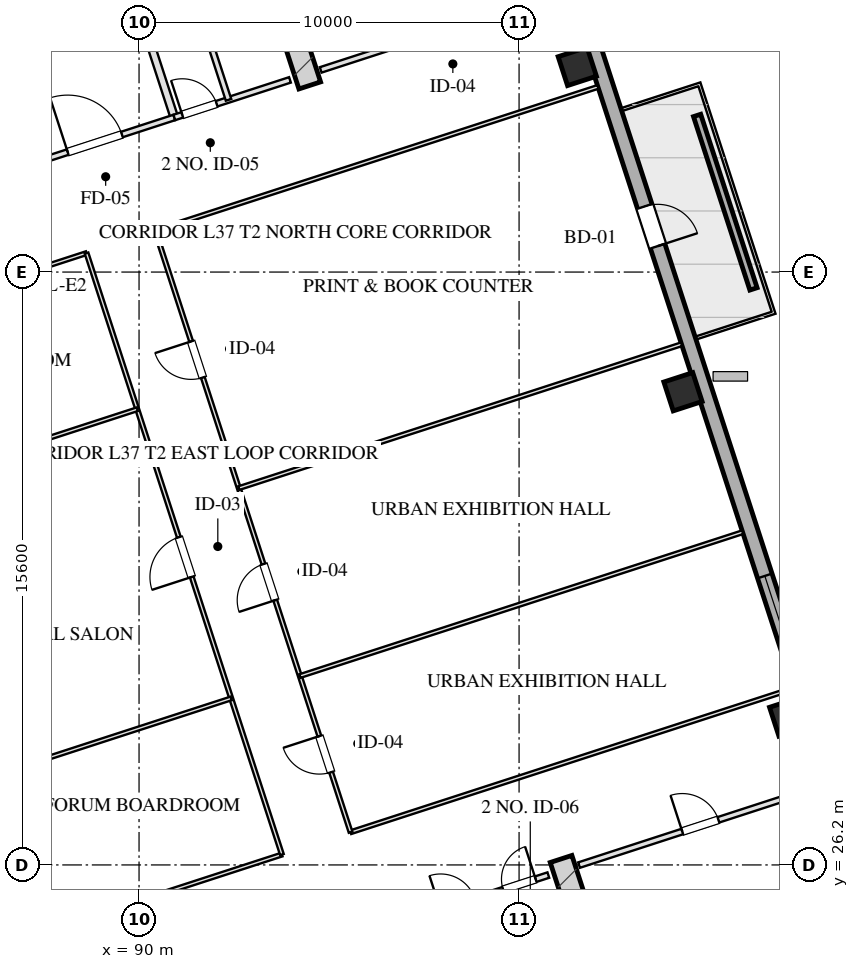
"""IFC4 building model, lengths in metres.
Left out: names, types, materials, properties, quantities, classifications, styles, units other than length and angle.
Written with IfcOpenShell. Run it as: python <this file> out.ifc"""

import sys

from ifc_helpers import new_model, si_unit, direction, frame, frame_2d, origin, origin_2d, place, context, subcontext, project, spatial, rectangle, hollow_rectangle, extrude, element, fill, save


model = new_model("IFC4")
c1 = context("Model", 3, precision=1e-05, world=origin(), true_north=direction((0.0, 1.0)))
c2 = subcontext(c1, "Body", "Model", "MODEL_VIEW")
j1 = project(units=[si_unit("LENGTHUNIT", "METRE"), si_unit("PLANEANGLEUNIT", "RADIAN")], contexts=[c1])
p1 = place(None, origin())
s1 = spatial("IfcSite", under=j1, at=p1, CompositionType="ELEMENT")
p2 = place(p1, origin())
s2 = spatial("IfcBuilding", under=s1, at=p2, CompositionType="ELEMENT")
p3 = place(p2, frame((0.0, 0.0, 142.6)))
s3 = spatial("IfcBuildingStorey", under=s2, at=p3, CompositionType="ELEMENT", Elevation=142.6)
for number, where, z_axis, x_axis in (
    (1, (101.105, 26.358, 0.0), (0.0, 0.0, 1.0), (0.309, -0.951, 0.0)),
    (2, (94.492, 46.71, 0.0), (0.0, 0.0, 1.0), (-0.309, 0.951, 0.0)),
):
    element("IfcWall", number, at=place(p3, frame(where, z_axis=z_axis, x_axis=x_axis)), inside=s3, PredefinedType="SHEAR", context=c2, shape_type="SweptSolid", body=[
        extrude(rectangle(XDim=9.48, YDim=0.6, at=frame_2d((4.74, 0.0))), origin(), (0.0, 0.0, 1.0), 3.45),
    ])
for number, where, z_axis, x_axis in (
    (3, (107.094, 30.091, 0.0), (0.0, 0.0, 1.0), (0.951, 0.309, 0.0)),
    (4, (104.313, 38.651, 0.0), (0.0, 0.0, 1.0), (0.951, 0.309, 0.0)),
    (5, (101.532, 47.21, 0.0), (0.0, 0.0, 1.0), (0.951, 0.309, 0.0)),
):
    element("IfcColumn", number, at=place(p3, frame(where, z_axis=z_axis, x_axis=x_axis)), inside=s3, PredefinedType="COLUMN", context=c2, shape_type="SweptSolid", body=[
        extrude(hollow_rectangle(XDim=0.8, YDim=0.8, WallThickness=0.028, at=origin_2d()), origin(), (0.0, 0.0, 1.0), 3.451),
    ])
p4 = place(p3, frame((98.224, 59.173, 0.0), z_axis=(0.0, 0.0, 1.0), x_axis=(0.309014228706, -0.951057414911, 0.0)))
e6 = element("IfcWall", 6, at=p4, inside=s3, PredefinedType="SOLIDWALL", context=c2, shape_type="SweptSolid", body=[
    extrude(rectangle(XDim=42.8, YDim=0.4, at=frame_2d((21.4, 0.0))), origin(), (0.0, 0.0, 1.0), 2.61),
])
p5 = place(p4, frame((26.675, 0.0, 0.75)))
e7 = element("IfcOpeningElement", 7, at=p5, cuts=e6, PredefinedType="OPENING", context=c2, shape_type="SweptSolid", body=[
    extrude(rectangle(XDim=2.25, YDim=1.46, at=frame_2d((1.125, 0.73))), frame((0.0, 0.21, 0.0), z_axis=(0.0, -1.0, 0.0), x_axis=(1.0, 0.0, 0.0)), (0.0, 0.0, 1.0), 0.42),
])
p6 = place(p4, frame((16.45, 0.0, 0.0)))
e8 = element("IfcOpeningElement", 8, at=p6, cuts=e6, PredefinedType="OPENING", context=c2, shape_type="SweptSolid", body=[
    extrude(rectangle(XDim=1.1, YDim=2.15, at=frame_2d((0.55, 1.075))), frame((0.0, 0.21, 0.0), z_axis=(0.0, -1.0, 0.0), x_axis=(1.0, 0.0, 0.0)), (0.0, 0.0, 1.0), 0.42),
])
p7 = place(p3, frame((106.168, 41.356, 0.0), z_axis=(0.0, 0.0, 1.0), x_axis=(-0.309032019345, 0.951051634255, 0.0)))
e9 = element("IfcWall", 9, at=p7, inside=s3, PredefinedType="PARAPET", context=c2, shape_type="SweptSolid", body=[
    extrude(rectangle(XDim=4.8, YDim=0.2, at=frame_2d((2.4, 0.0))), origin(), (0.0, 0.0, 1.0), 0.75),
])
p8 = place(p3, frame((97.727, 24.944, 0.0), z_axis=(0.0, 0.0, 1.0), x_axis=(0.951036872128, 0.309077446369, 0.0)))
e10 = element("IfcWall", 10, at=p8, inside=s3, PredefinedType="PARTITIONING", context=c2, shape_type="SweptSolid", body=[
    extrude(rectangle(XDim=3.2, YDim=0.15, at=frame_2d((1.6, 0.0))), origin(), (0.0, 0.0, 1.0), 3.175),
])
p9 = place(p8, frame((0.22, 0.0, 0.0)))
e11 = element("IfcOpeningElement", 11, at=p9, cuts=e10, PredefinedType="OPENING", context=c2, shape_type="SweptSolid", body=[
    extrude(rectangle(XDim=0.95, YDim=2.05, at=frame_2d((0.475, 1.025))), frame((0.0, 0.085, 0.0), z_axis=(0.0, -1.0, 0.0), x_axis=(1.0, 0.0, 0.0)), (0.0, 0.0, 1.0), 0.17),
])
p10 = place(p8, frame((1.95, 0.0, 0.0)))
e12 = element("IfcOpeningElement", 12, at=p10, cuts=e10, PredefinedType="OPENING", context=c2, shape_type="SweptSolid", body=[
    extrude(rectangle(XDim=0.9, YDim=2.05, at=frame_2d((0.45, 1.025))), frame((0.0, 0.085, 0.0), z_axis=(0.0, -1.0, 0.0), x_axis=(1.0, 0.0, 0.0)), (0.0, 0.0, 1.0), 0.17),
])
p11 = place(p3, frame((90.928, 45.868, 0.0), z_axis=(0.0, 0.0, 1.0), x_axis=(-0.309042196757, 0.951048327176, 0.0)))
e13 = element("IfcWall", 13, at=p11, inside=s3, PredefinedType="PARTITIONING", context=c2, shape_type="SweptSolid", body=[
    extrude(rectangle(XDim=8.43, YDim=0.2, at=frame_2d((4.215, 0.0))), origin(), (0.0, 0.0, 1.0), 3.175),
])
p12 = place(p3, frame((86.743, 44.508, 0.0), z_axis=(0.0, 0.0, 1.0), x_axis=(0.951063829732, 0.308994485023, 0.0)))
e14 = element("IfcWall", 14, at=p12, inside=s3, PredefinedType="PARTITIONING", context=c2, shape_type="SweptSolid", body=[
    extrude(rectangle(XDim=4.4, YDim=0.15, at=frame_2d((2.2, 0.0))), origin(), (0.0, 0.0, 1.0), 3.175),
])
p13 = place(p12, frame((1.45, 0.0, 0.0)))
e15 = element("IfcOpeningElement", 15, at=p13, cuts=e14, PredefinedType="OPENING", context=c2, shape_type="SweptSolid", body=[
    extrude(rectangle(XDim=1.5, YDim=2.05, at=frame_2d((0.75, 1.025))), frame((0.0, 0.085, 0.0), z_axis=(0.0, -1.0, 0.0), x_axis=(1.0, 0.0, 0.0)), (0.0, 0.0, 1.0), 0.17),
])
p14 = place(p3, frame((85.718, 47.666, 0.0), z_axis=(0.0, 0.0, 1.0), x_axis=(0.951058531764, 0.30901079133, 0.0)))
e16 = element("IfcWall", 16, at=p14, inside=s3, PredefinedType="PARTITIONING", context=c2, shape_type="SweptSolid", body=[
    extrude(rectangle(XDim=4.4, YDim=0.2, at=frame_2d((2.2, 0.0))), origin(), (0.0, 0.0, 1.0), 3.175),
])
p15 = place(p14, frame((0.45, 0.0, 0.0)))
e17 = element("IfcOpeningElement", 17, at=p15, cuts=e16, PredefinedType="OPENING", context=c2, shape_type="SweptSolid", body=[
    extrude(rectangle(XDim=1.1, YDim=2.05, at=frame_2d((0.55, 1.025))), frame((0.0, 0.11, 0.0), z_axis=(0.0, -1.0, 0.0), x_axis=(1.0, 0.0, 0.0)), (0.0, 0.0, 1.0), 0.22),
])
p16 = place(p14, frame((2.55, 0.0, 0.0)))
e18 = element("IfcOpeningElement", 18, at=p16, cuts=e16, PredefinedType="OPENING", context=c2, shape_type="SweptSolid", body=[
    extrude(rectangle(XDim=1.1, YDim=2.05, at=frame_2d((0.55, 1.025))), frame((0.0, 0.11, 0.0), z_axis=(0.0, -1.0, 0.0), x_axis=(1.0, 0.0, 0.0)), (0.0, 0.0, 1.0), 0.22),
])
p17 = place(p3, frame((90.928, 45.868, 0.0), z_axis=(0.0, 0.0, 1.0), x_axis=(0.951059297078, 0.309008435874, 0.0)))
e19 = element("IfcWall", 19, at=p17, inside=s3, PredefinedType="PARTITIONING", context=c2, shape_type="SweptSolid", body=[
    extrude(rectangle(XDim=3.2, YDim=0.15, at=frame_2d((1.6, 0.0))), origin(), (0.0, 0.0, 1.0), 3.175),
])
p18 = place(p17, frame((0.22, 0.0, 0.0)))
e20 = element("IfcOpeningElement", 20, at=p18, cuts=e19, PredefinedType="OPENING", context=c2, shape_type="SweptSolid", body=[
    extrude(rectangle(XDim=0.95, YDim=2.05, at=frame_2d((0.475, 1.025))), frame((0.0, 0.085, 0.0), z_axis=(0.0, -1.0, 0.0), x_axis=(1.0, 0.0, 0.0)), (0.0, 0.0, 1.0), 0.17),
])
p19 = place(p3, frame((92.355, 46.331, 0.0), z_axis=(0.0, 0.0, 1.0), x_axis=(-0.309007490203, 0.951059604335, 0.0)))
e21 = element("IfcWall", 21, at=p19, inside=s3, PredefinedType="PARTITIONING", context=c2, shape_type="SweptSolid", body=[
    extrude(rectangle(XDim=8.43, YDim=0.15, at=frame_2d((4.215, 0.0))), origin(), (0.0, 0.0, 1.0), 3.175),
])
p20 = place(p19, frame((2.55, 0.0, 0.0)))
e22 = element("IfcOpeningElement", 22, at=p20, cuts=e21, PredefinedType="OPENING", context=c2, shape_type="SweptSolid", body=[
    extrude(rectangle(XDim=0.95, YDim=2.05, at=frame_2d((0.475, 1.025))), frame((0.0, 0.085, 0.0), z_axis=(0.0, -1.0, 0.0), x_axis=(1.0, 0.0, 0.0)), (0.0, 0.0, 1.0), 0.17),
])
p21 = place(p19, frame((5.8, 0.0, 0.0)))
e23 = element("IfcOpeningElement", 23, at=p21, cuts=e21, PredefinedType="OPENING", context=c2, shape_type="SweptSolid", body=[
    extrude(rectangle(XDim=0.9, YDim=2.05, at=frame_2d((0.45, 1.025))), frame((0.0, 0.085, 0.0), z_axis=(0.0, -1.0, 0.0), x_axis=(1.0, 0.0, 0.0)), (0.0, 0.0, 1.0), 0.17),
])
p22 = place(p3, frame((101.578, 26.196, 0.0), z_axis=(0.0, 0.0, 1.0), x_axis=(0.951064934653, 0.308991084134, 0.0)))
e24 = element("IfcWall", 24, at=p22, inside=s3, PredefinedType="PARTITIONING", context=c2, shape_type="SweptSolid", body=[
    extrude(rectangle(XDim=6.8, YDim=0.15, at=frame_2d((3.4, 0.0))), origin(), (0.0, 0.0, 1.0), 3.175),
])
p23 = place(p22, frame((2.856, 0.0, 0.0)))
e25 = element("IfcOpeningElement", 25, at=p23, cuts=e24, PredefinedType="OPENING", context=c2, shape_type="SweptSolid", body=[
    extrude(rectangle(XDim=1.0, YDim=2.05, at=frame_2d((0.5, 1.025))), frame((0.0, 0.085, 0.0), z_axis=(0.0, -1.0, 0.0), x_axis=(1.0, 0.0, 0.0)), (0.0, 0.0, 1.0), 0.17),
])
p24 = place(p3, frame((94.78, 47.119, 0.0), z_axis=(0.0, 0.0, 1.0), x_axis=(0.951057811516, 0.309013008068, 0.0)))
e26 = element("IfcWall", 26, at=p24, inside=s3, PredefinedType="PARTITIONING", context=c2, shape_type="SweptSolid", body=[
    extrude(rectangle(XDim=6.8, YDim=0.15, at=frame_2d((3.4, 0.0))), origin(), (0.0, 0.0, 1.0), 3.175),
])
p25 = place(p24, frame((2.856, 0.0, 0.0)))
e27 = element("IfcOpeningElement", 27, at=p25, cuts=e26, PredefinedType="OPENING", context=c2, shape_type="SweptSolid", body=[
    extrude(rectangle(XDim=1.0, YDim=2.05, at=frame_2d((0.5, 1.025))), frame((0.0, 0.085, 0.0), z_axis=(0.0, -1.0, 0.0), x_axis=(1.0, 0.0, 0.0)), (0.0, 0.0, 1.0), 0.17),
])
p26 = place(p3, frame((85.248, 23.708, 0.0), z_axis=(0.0, 0.0, 1.0), x_axis=(0.951059123431, 0.309008970321, 0.0)))
e28 = element("IfcWall", 28, at=p26, inside=s3, PredefinedType="MOVABLE", context=c2, shape_type="SweptSolid", body=[
    extrude(rectangle(XDim=8.95, YDim=0.1, at=frame_2d((4.475, 0.0))), origin(), (0.0, 0.0, 1.0), 3.175),
])
p27 = place(p3, frame((95.567, 27.061, 0.0), z_axis=(0.0, 0.0, 1.0), x_axis=(0.9510516424, 0.30903199428, 0.0)))
e29 = element("IfcWall", 29, at=p27, inside=s3, PredefinedType="MOVABLE", context=c2, shape_type="SweptSolid", body=[
    extrude(rectangle(XDim=12.25, YDim=0.1, at=frame_2d((6.125, 0.0))), origin(), (0.0, 0.0, 1.0), 3.175),
])
p28 = place(p3, frame((80.106, 39.533, 0.0), z_axis=(0.0, 0.0, 1.0), x_axis=(0.951059123431, 0.309008970321, 0.0)))
e30 = element("IfcWall", 30, at=p28, inside=s3, PredefinedType="MOVABLE", context=c2, shape_type="SweptSolid", body=[
    extrude(rectangle(XDim=8.95, YDim=0.1, at=frame_2d((4.475, 0.0))), origin(), (0.0, 0.0, 1.0), 3.175),
])
p29 = place(p3, frame((90.425, 42.886, 0.0), z_axis=(0.0, 0.0, 1.0), x_axis=(0.95105749975, 0.309013967595, 0.0)))
e31 = element("IfcWall", 31, at=p29, inside=s3, PredefinedType="MOVABLE", context=c2, shape_type="SweptSolid", body=[
    extrude(rectangle(XDim=12.25, YDim=0.1, at=frame_2d((6.125, 0.0))), origin(), (0.0, 0.0, 1.0), 3.175),
])
p30 = place(p3, frame((93.76, 26.473, 0.0), z_axis=(0.0, 0.0, 1.0), x_axis=(-0.309004459387, 0.951060589068, 0.0)))
e32 = element("IfcWall", 32, at=p30, inside=s3, PredefinedType="MOVABLE", context=c2, shape_type="SweptSolid", body=[
    extrude(rectangle(XDim=16.64, YDim=0.1, at=frame_2d((8.32, 0.0))), origin(), (0.0, 0.0, 1.0), 3.175),
])
p31 = place(p30, frame((7.68, 0.0, 0.0)))
e33 = element("IfcOpeningElement", 33, at=p31, cuts=e32, PredefinedType="OPENING", context=c2, shape_type="SweptSolid", body=[
    extrude(rectangle(XDim=1.1, YDim=2.05, at=frame_2d((0.55, 1.025))), frame((0.0, 0.06, 0.0), z_axis=(0.0, -1.0, 0.0), x_axis=(1.0, 0.0, 0.0)), (0.0, 0.0, 1.0), 0.12),
])
p32 = place(p3, frame((95.567, 27.061, 0.0), z_axis=(0.0, 0.0, 1.0), x_axis=(-0.30901773025, 0.951056277195, 0.0)))
e34 = element("IfcWall", 34, at=p32, inside=s3, PredefinedType="MOVABLE", context=c2, shape_type="SweptSolid", body=[
    extrude(rectangle(XDim=16.64, YDim=0.1, at=frame_2d((8.32, 0.0))), origin(), (0.0, 0.0, 1.0), 3.175),
])
p33 = place(p32, frame((1.66, 0.0, 0.0)))
e35 = element("IfcOpeningElement", 35, at=p33, cuts=e34, PredefinedType="OPENING", context=c2, shape_type="SweptSolid", body=[
    extrude(rectangle(XDim=1.0, YDim=2.05, at=frame_2d((0.5, 1.025))), frame((0.0, 0.06, 0.0), z_axis=(0.0, -1.0, 0.0), x_axis=(1.0, 0.0, 0.0)), (0.0, 0.0, 1.0), 0.12),
])
p34 = place(p32, frame((6.42, 0.0, 0.0)))
e36 = element("IfcOpeningElement", 36, at=p34, cuts=e34, PredefinedType="OPENING", context=c2, shape_type="SweptSolid", body=[
    extrude(rectangle(XDim=1.0, YDim=2.05, at=frame_2d((0.5, 1.025))), frame((0.0, 0.06, 0.0), z_axis=(0.0, -1.0, 0.0), x_axis=(1.0, 0.0, 0.0)), (0.0, 0.0, 1.0), 0.12),
])
p35 = place(p32, frame((12.58, 0.0, 0.0)))
e37 = element("IfcOpeningElement", 37, at=p35, cuts=e34, PredefinedType="OPENING", context=c2, shape_type="SweptSolid", body=[
    extrude(rectangle(XDim=1.0, YDim=2.05, at=frame_2d((0.5, 1.025))), frame((0.0, 0.06, 0.0), z_axis=(0.0, -1.0, 0.0), x_axis=(1.0, 0.0, 0.0)), (0.0, 0.0, 1.0), 0.12),
])
p36 = place(p3, frame((83.913, 27.816, 0.0), z_axis=(0.0, 0.0, 1.0), x_axis=(0.951059123431, 0.309008970321, 0.0)))
e38 = element("IfcWall", 38, at=p36, inside=s3, PredefinedType="MOVABLE", context=c2, shape_type="SweptSolid", body=[
    extrude(rectangle(XDim=8.95, YDim=0.1, at=frame_2d((4.475, 0.0))), origin(), (0.0, 0.0, 1.0), 3.175),
])
p37 = place(p3, frame((81.441, 35.425, 0.0), z_axis=(0.0, 0.0, 1.0), x_axis=(0.951056518616, 0.309016987233, 0.0)))
e39 = element("IfcWall", 39, at=p37, inside=s3, PredefinedType="MOVABLE", context=c2, shape_type="SweptSolid", body=[
    extrude(rectangle(XDim=8.95, YDim=0.1, at=frame_2d((4.475, 0.0))), origin(), (0.0, 0.0, 1.0), 3.175),
])
for number, where, z_axis, x_axis in (
    (40, (94.232, 31.169, 0.0), (0.0, 0.0, 1.0), (0.951, 0.309, 0.0)),
    (41, (92.625, 36.115, 0.0), (0.0, 0.0, 1.0), (0.951, 0.309, 0.0)),
):
    element("IfcWall", number, at=place(p3, frame(where, z_axis=z_axis, x_axis=x_axis)), inside=s3, PredefinedType="MOVABLE", context=c2, shape_type="SweptSolid", body=[
        extrude(rectangle(XDim=12.25, YDim=0.1, at=frame_2d((6.125, 0.0))), origin(), (0.0, 0.0, 1.0), 3.175),
    ])
p38 = place(p5, origin())
e42 = element("IfcWindow", 42, at=p38, inside=s3, PartitioningType="TRIPLE_PANEL_VERTICAL", PredefinedType="WINDOW", context=c2, shape_type="SweptSolid", body=[
    extrude(rectangle(XDim=2.25, YDim=1.46, at=frame_2d((1.125, 0.73))), frame((0.0, 0.03, 0.0), z_axis=(0.0, -1.0, 0.0), x_axis=(1.0, 0.0, 0.0)), (0.0, 0.0, 1.0), 0.06),
])
fill(e7, e42)
p39 = place(p6, origin())
e43 = element("IfcDoor", 43, at=p39, inside=s3, OperationType="SINGLE_SWING_RIGHT", PredefinedType="DOOR", context=c2, shape_type="SweptSolid", body=[
    extrude(rectangle(XDim=1.1, YDim=2.15, at=frame_2d((0.55, 1.075))), frame((0.0, 0.025, 0.0), z_axis=(0.0, -1.0, 0.0), x_axis=(1.0, 0.0, 0.0)), (0.0, 0.0, 1.0), 0.05),
])
fill(e8, e43)
p40 = place(p10, origin())
e44 = element("IfcDoor", 44, at=p40, inside=s3, OperationType="SINGLE_SWING_RIGHT", PredefinedType="DOOR", context=c2, shape_type="SweptSolid", body=[
    extrude(rectangle(XDim=0.9, YDim=2.05, at=frame_2d((0.45, 1.025))), frame((0.0, 0.025, 0.0), z_axis=(0.0, -1.0, 0.0), x_axis=(1.0, 0.0, 0.0)), (0.0, 0.0, 1.0), 0.05),
])
fill(e12, e44)
p41 = place(p13, origin())
e45 = element("IfcDoor", 45, at=p41, inside=s3, OperationType="SINGLE_SWING_LEFT", PredefinedType="DOOR", context=c2, shape_type="SweptSolid", body=[
    extrude(rectangle(XDim=1.5, YDim=2.05, at=frame_2d((0.75, 1.025))), frame((0.0, 0.025, 0.0), z_axis=(0.0, -1.0, 0.0), x_axis=(1.0, 0.0, 0.0)), (0.0, 0.0, 1.0), 0.05),
])
fill(e15, e45)
p42 = place(p18, origin())
e46 = element("IfcDoor", 46, at=p42, inside=s3, OperationType="SINGLE_SWING_LEFT", PredefinedType="DOOR", context=c2, shape_type="SweptSolid", body=[
    extrude(rectangle(XDim=0.95, YDim=2.05, at=frame_2d((0.475, 1.025))), frame((0.0, 0.025, 0.0), z_axis=(0.0, -1.0, 0.0), x_axis=(1.0, 0.0, 0.0)), (0.0, 0.0, 1.0), 0.05),
])
fill(e20, e46)
p43 = place(p23, origin())
e47 = element("IfcDoor", 47, at=p43, inside=s3, OperationType="SINGLE_SWING_LEFT", PredefinedType="DOOR", context=c2, shape_type="SweptSolid", body=[
    extrude(rectangle(XDim=1.0, YDim=2.05, at=frame_2d((0.5, 1.025))), frame((0.0, 0.025, 0.0), z_axis=(0.0, -1.0, 0.0), x_axis=(1.0, 0.0, 0.0)), (0.0, 0.0, 1.0), 0.05),
])
fill(e25, e47)
p44 = place(p31, origin())
e48 = element("IfcDoor", 48, at=p44, inside=s3, OperationType="SINGLE_SWING_LEFT", PredefinedType="DOOR", context=c2, shape_type="SweptSolid", body=[
    extrude(rectangle(XDim=1.1, YDim=2.05, at=frame_2d((0.55, 1.025))), frame((0.0, 0.025, 0.0), z_axis=(0.0, -1.0, 0.0), x_axis=(1.0, 0.0, 0.0)), (0.0, 0.0, 1.0), 0.05),
])
fill(e33, e48)
p45 = place(p33, origin())
e49 = element("IfcDoor", 49, at=p45, inside=s3, OperationType="SINGLE_SWING_RIGHT", PredefinedType="DOOR", context=c2, shape_type="SweptSolid", body=[
    extrude(rectangle(XDim=1.0, YDim=2.05, at=frame_2d((0.5, 1.025))), frame((0.0, 0.025, 0.0), z_axis=(0.0, -1.0, 0.0), x_axis=(1.0, 0.0, 0.0)), (0.0, 0.0, 1.0), 0.05),
])
fill(e35, e49)
p46 = place(p34, origin())
e50 = element("IfcDoor", 50, at=p46, inside=s3, OperationType="SINGLE_SWING_LEFT", PredefinedType="DOOR", context=c2, shape_type="SweptSolid", body=[
    extrude(rectangle(XDim=1.0, YDim=2.05, at=frame_2d((0.5, 1.025))), frame((0.0, 0.025, 0.0), z_axis=(0.0, -1.0, 0.0), x_axis=(1.0, 0.0, 0.0)), (0.0, 0.0, 1.0), 0.05),
])
fill(e36, e50)
p47 = place(p35, origin())
e51 = element("IfcDoor", 51, at=p47, inside=s3, OperationType="SINGLE_SWING_RIGHT", PredefinedType="DOOR", context=c2, shape_type="SweptSolid", body=[
    extrude(rectangle(XDim=1.0, YDim=2.05, at=frame_2d((0.5, 1.025))), frame((0.0, 0.025, 0.0), z_axis=(0.0, -1.0, 0.0), x_axis=(1.0, 0.0, 0.0)), (0.0, 0.0, 1.0), 0.05),
])
fill(e37, e51)
save(model, sys.argv[1])
